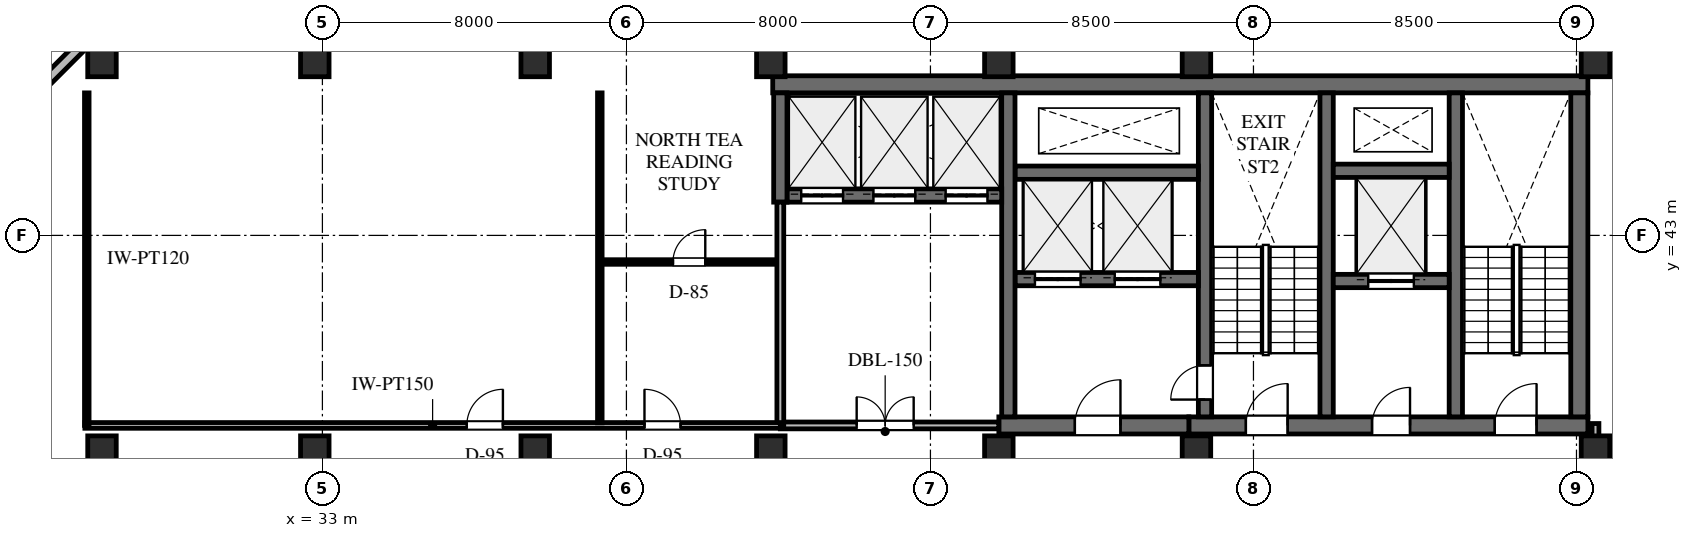
"""IFC4 building model, lengths in metres.
Left out: names, types, materials, properties, quantities, classifications, styles, units other than length and angle.
Written with IfcOpenShell. Run it as: python <this file> out.ifc"""

import sys

from ifc_helpers import new_model, si_unit, direction, frame, frame_2d, origin, origin_2d, place, context, subcontext, project, spatial, rectangle, extrude, element, fill, save


model = new_model("IFC4")
c1 = context("Model", 3, precision=1e-05, world=origin(), true_north=direction((0.0, 1.0)))
c2 = subcontext(c1, "Body", "Model", "MODEL_VIEW")
j1 = project(units=[si_unit("LENGTHUNIT", "METRE"), si_unit("PLANEANGLEUNIT", "RADIAN")], contexts=[c1])
p1 = place(None, origin())
s1 = spatial("IfcSite", under=j1, at=p1, CompositionType="ELEMENT")
p2 = place(p1, origin())
s2 = spatial("IfcBuilding", under=s1, at=p2, CompositionType="ELEMENT")
p3 = place(p2, frame((0.0, 0.0, 256.2)))
s3 = spatial("IfcBuildingStorey", under=s2, at=p3, CompositionType="ELEMENT", Elevation=256.2)
p4 = place(p3, frame((44.85, 46.975, 0.0), z_axis=(0.0, 0.0, 1.0), x_axis=(1.0, 0.0, 0.0)))
e1 = element("IfcWall", 1, at=p4, inside=s3, PredefinedType="SHEAR", context=c2, shape_type="SweptSolid", body=[
    extrude(rectangle(XDim=21.45, YDim=0.45, at=frame_2d((10.725, 0.0))), origin(), (0.0, 0.0, 1.0), 3.6),
])
p5 = place(p3, frame((55.8, 38.0, 0.0), z_axis=(0.0, 0.0, 1.0), x_axis=(1.0, 0.0, 0.0)))
e2 = element("IfcWall", 2, at=p5, inside=s3, PredefinedType="SHEAR", context=c2, shape_type="SweptSolid", body=[
    extrude(rectangle(XDim=10.5, YDim=0.45, at=frame_2d((5.25, 0.0))), origin(), (0.0, 0.0, 1.0), 3.6),
])
p6 = place(p5, frame((1.5, 0.0, 0.0)))
e3 = element("IfcOpeningElement", 3, at=p6, cuts=e2, PredefinedType="OPENING", context=c2, shape_type="SweptSolid", body=[
    extrude(rectangle(XDim=1.1, YDim=2.2, at=frame_2d((0.55, 1.1))), frame((0.0, 0.235, 0.0), z_axis=(0.0, -1.0, 0.0), x_axis=(1.0, 0.0, 0.0)), (0.0, 0.0, 1.0), 0.47),
])
p7 = place(p5, frame((4.82, 0.0, 0.0)))
e4 = element("IfcOpeningElement", 4, at=p7, cuts=e2, PredefinedType="OPENING", context=c2, shape_type="SweptSolid", body=[
    extrude(rectangle(XDim=1.0, YDim=2.15, at=frame_2d((0.5, 1.075))), frame((0.0, 0.235, 0.0), z_axis=(0.0, -1.0, 0.0), x_axis=(1.0, 0.0, 0.0)), (0.0, 0.0, 1.0), 0.47),
])
p8 = place(p5, frame((8.05, 0.0, 0.0)))
e5 = element("IfcOpeningElement", 5, at=p8, cuts=e2, PredefinedType="OPENING", context=c2, shape_type="SweptSolid", body=[
    extrude(rectangle(XDim=1.1, YDim=2.2, at=frame_2d((0.55, 1.1))), frame((0.0, 0.235, 0.0), z_axis=(0.0, -1.0, 0.0), x_axis=(1.0, 0.0, 0.0)), (0.0, 0.0, 1.0), 0.47),
])
p9 = place(p3, frame((66.075, 38.225, 0.0), z_axis=(0.0, 0.0, 1.0), x_axis=(0.0, 1.0, 0.0)))
e6 = element("IfcWall", 6, at=p9, inside=s3, PredefinedType="SHEAR", context=c2, shape_type="SweptSolid", body=[
    extrude(rectangle(XDim=8.525, YDim=0.45, at=frame_2d((4.262, 0.0))), origin(), (0.0, 0.0, 1.0), 3.6),
])
for number, where, z_axis, x_axis in (
    (7, (62.825, 38.225, 0.0), (0.0, 0.0, 1.0), (0.0, 1.0, 0.0)),
    (8, (59.425, 38.225, 0.0), (0.0, 0.0, 1.0), (0.0, 1.0, 0.0)),
):
    element("IfcWall", number, at=place(p3, frame(where, z_axis=z_axis, x_axis=x_axis)), inside=s3, PredefinedType="SHEAR", context=c2, shape_type="SweptSolid", body=[
        extrude(rectangle(XDim=8.525, YDim=0.35, at=frame_2d((4.262, 0.0))), origin(), (0.0, 0.0, 1.0), 3.6),
    ])
p10 = place(p3, frame((56.225, 38.225, 0.0), z_axis=(0.0, 0.0, 1.0), x_axis=(0.0, 1.0, 0.0)))
e9 = element("IfcWall", 9, at=p10, inside=s3, PredefinedType="SHEAR", context=c2, shape_type="SweptSolid", body=[
    extrude(rectangle(XDim=8.525, YDim=0.35, at=frame_2d((4.262, 0.0))), origin(), (0.0, 0.0, 1.0), 3.6),
])
p11 = place(p10, frame((0.455, 0.0, 0.0)))
e10 = element("IfcOpeningElement", 10, at=p11, cuts=e9, PredefinedType="OPENING", context=c2, shape_type="SweptSolid", body=[
    extrude(rectangle(XDim=0.9, YDim=2.15, at=frame_2d((0.45, 1.075))), frame((0.0, 0.185, 0.0), z_axis=(0.0, -1.0, 0.0), x_axis=(1.0, 0.0, 0.0)), (0.0, 0.0, 1.0), 0.37),
])
p12 = place(p3, frame((59.6, 41.8, 0.0), z_axis=(0.0, 0.0, 1.0), x_axis=(1.0, 0.0, 0.0)))
e11 = element("IfcWall", 11, at=p12, inside=s3, PredefinedType="SHEAR", context=c2, shape_type="SweptSolid", body=[
    extrude(rectangle(XDim=3.05, YDim=0.35, at=frame_2d((1.525, 0.0))), origin(), (0.0, 0.0, 1.0), 3.6),
])
p13 = place(p12, frame((0.92, 0.0, 0.0)))
e12 = element("IfcOpeningElement", 12, at=p13, cuts=e11, PredefinedType="OPENING", context=c2, shape_type="SweptSolid", body=[
    extrude(rectangle(XDim=1.2, YDim=2.2, at=frame_2d((0.6, 1.1))), frame((0.0, 0.185, 0.0), z_axis=(0.0, -1.0, 0.0), x_axis=(1.0, 0.0, 0.0)), (0.0, 0.0, 1.0), 0.37),
])
p14 = place(p3, frame((59.6, 44.7, 0.0), z_axis=(0.0, 0.0, 1.0), x_axis=(1.0, 0.0, 0.0)))
e13 = element("IfcWall", 13, at=p14, inside=s3, PredefinedType="SHEAR", context=c2, shape_type="SweptSolid", body=[
    extrude(rectangle(XDim=3.05, YDim=0.35, at=frame_2d((1.525, 0.0))), origin(), (0.0, 0.0, 1.0), 3.6),
])
p15 = place(p3, frame((50.8, 38.0, 0.0), z_axis=(0.0, 0.0, 1.0), x_axis=(1.0, 0.0, 0.0)))
e14 = element("IfcWall", 14, at=p15, inside=s3, PredefinedType="SHEAR", context=c2, shape_type="SweptSolid", body=[
    extrude(rectangle(XDim=5.0, YDim=0.45, at=frame_2d((2.5, 0.0))), origin(), (0.0, 0.0, 1.0), 3.6),
])
p16 = place(p15, frame((2.0, 0.0, 0.0)))
e15 = element("IfcOpeningElement", 15, at=p16, cuts=e14, PredefinedType="OPENING", context=c2, shape_type="SweptSolid", body=[
    extrude(rectangle(XDim=1.2, YDim=2.2, at=frame_2d((0.6, 1.1))), frame((0.0, 0.235, 0.0), z_axis=(0.0, -1.0, 0.0), x_axis=(1.0, 0.0, 0.0)), (0.0, 0.0, 1.0), 0.47),
])
p17 = place(p3, frame((51.225, 41.85, 0.0), z_axis=(0.0, 0.0, 1.0), x_axis=(1.0, 0.0, 0.0)))
e16 = element("IfcWall", 16, at=p17, inside=s3, PredefinedType="SHEAR", context=c2, shape_type="SweptSolid", body=[
    extrude(rectangle(XDim=4.825, YDim=0.35, at=frame_2d((2.413, 0.0))), origin(), (0.0, 0.0, 1.0), 3.6),
])
p18 = place(p17, frame((0.525, 0.0, 0.0)))
e17 = element("IfcOpeningElement", 17, at=p18, cuts=e16, PredefinedType="OPENING", context=c2, shape_type="SweptSolid", body=[
    extrude(rectangle(XDim=1.2, YDim=2.2, at=frame_2d((0.6, 1.1))), frame((0.0, 0.185, 0.0), z_axis=(0.0, -1.0, 0.0), x_axis=(1.0, 0.0, 0.0)), (0.0, 0.0, 1.0), 0.37),
])
p19 = place(p17, frame((2.625, 0.0, 0.0)))
e18 = element("IfcOpeningElement", 18, at=p19, cuts=e16, PredefinedType="OPENING", context=c2, shape_type="SweptSolid", body=[
    extrude(rectangle(XDim=1.2, YDim=2.2, at=frame_2d((0.6, 1.1))), frame((0.0, 0.185, 0.0), z_axis=(0.0, -1.0, 0.0), x_axis=(1.0, 0.0, 0.0)), (0.0, 0.0, 1.0), 0.37),
])
p20 = place(p3, frame((51.225, 44.65, 0.0), z_axis=(0.0, 0.0, 1.0), x_axis=(1.0, 0.0, 0.0)))
e19 = element("IfcWall", 19, at=p20, inside=s3, PredefinedType="SHEAR", context=c2, shape_type="SweptSolid", body=[
    extrude(rectangle(XDim=4.825, YDim=0.35, at=frame_2d((2.413, 0.0))), origin(), (0.0, 0.0, 1.0), 3.6),
])
p21 = place(p3, frame((51.05, 38.225, 0.0), z_axis=(0.0, 0.0, 1.0), x_axis=(0.0, 1.0, 0.0)))
e20 = element("IfcWall", 20, at=p21, inside=s3, PredefinedType="SHEAR", context=c2, shape_type="SweptSolid", body=[
    extrude(rectangle(XDim=8.525, YDim=0.35, at=frame_2d((4.262, 0.0))), origin(), (0.0, 0.0, 1.0), 3.6),
])
p22 = place(p3, frame((45.225, 44.05, 0.0), z_axis=(0.0, 0.0, 1.0), x_axis=(1.0, 0.0, 0.0)))
e21 = element("IfcWall", 21, at=p22, inside=s3, PredefinedType="SHEAR", context=c2, shape_type="SweptSolid", body=[
    extrude(rectangle(XDim=5.65, YDim=0.35, at=frame_2d((2.825, 0.0))), origin(), (0.0, 0.0, 1.0), 3.6),
])
p23 = place(p22, frame((0.375, 0.0, 0.0)))
e22 = element("IfcOpeningElement", 22, at=p23, cuts=e21, PredefinedType="OPENING", context=c2, shape_type="SweptSolid", body=[
    extrude(rectangle(XDim=1.1, YDim=2.2, at=frame_2d((0.55, 1.1))), frame((0.0, 0.185, 0.0), z_axis=(0.0, -1.0, 0.0), x_axis=(1.0, 0.0, 0.0)), (0.0, 0.0, 1.0), 0.37),
])
p24 = place(p22, frame((2.275, 0.0, 0.0)))
e23 = element("IfcOpeningElement", 23, at=p24, cuts=e21, PredefinedType="OPENING", context=c2, shape_type="SweptSolid", body=[
    extrude(rectangle(XDim=1.1, YDim=2.2, at=frame_2d((0.55, 1.1))), frame((0.0, 0.185, 0.0), z_axis=(0.0, -1.0, 0.0), x_axis=(1.0, 0.0, 0.0)), (0.0, 0.0, 1.0), 0.37),
])
p25 = place(p22, frame((4.175, 0.0, 0.0)))
e24 = element("IfcOpeningElement", 24, at=p25, cuts=e21, PredefinedType="OPENING", context=c2, shape_type="SweptSolid", body=[
    extrude(rectangle(XDim=1.1, YDim=2.2, at=frame_2d((0.55, 1.1))), frame((0.0, 0.185, 0.0), z_axis=(0.0, -1.0, 0.0), x_axis=(1.0, 0.0, 0.0)), (0.0, 0.0, 1.0), 0.37),
])
p26 = place(p3, frame((45.05, 43.875, 0.0), z_axis=(0.0, 0.0, 1.0), x_axis=(0.0, 1.0, 0.0)))
e25 = element("IfcWall", 25, at=p26, inside=s3, PredefinedType="SHEAR", context=c2, shape_type="SweptSolid", body=[
    extrude(rectangle(XDim=2.875, YDim=0.35, at=frame_2d((1.438, 0.0))), origin(), (0.0, 0.0, 1.0), 3.6),
])
for number, where, z_axis, x_axis in (
    (26, (66.5, 47.55, 0.0), (0.0, 0.0, 1.0), (1.0, 0.0, 0.0)),
    (27, (56.0, 47.55, 0.0), (0.0, 0.0, 1.0), (1.0, 0.0, 0.0)),
    (28, (66.5, 37.35, 0.0), (0.0, 0.0, 1.0), (1.0, 0.0, 0.0)),
    (29, (56.0, 37.35, 0.0), (0.0, 0.0, 1.0), (1.0, 0.0, 0.0)),
    (30, (50.8, 47.55, 0.0), (0.0, 0.0, 1.0), (1.0, 0.0, 0.0)),
    (31, (50.8, 37.35, 0.0), (0.0, 0.0, 1.0), (1.0, 0.0, 0.0)),
    (32, (44.8, 37.35, 0.0), (0.0, 0.0, 1.0), (1.0, 0.0, 0.0)),
    (33, (44.8, 47.55, 0.0), (0.0, 0.0, 1.0), (1.0, 0.0, 0.0)),
    (34, (38.6, 37.35, 0.0), (0.0, 0.0, 1.0), (1.0, 0.0, 0.0)),
    (35, (38.6, 47.55, 0.0), (0.0, 0.0, 1.0), (1.0, 0.0, 0.0)),
    (36, (32.8, 37.35, 0.0), (0.0, 0.0, 1.0), (1.0, 0.0, 0.0)),
    (37, (32.8, 47.55, 0.0), (0.0, 0.0, 1.0), (1.0, 0.0, 0.0)),
    (38, (27.2, 37.35, 0.0), (0.0, 0.0, 1.0), (1.0, 0.0, 0.0)),
    (39, (27.2, 47.55, 0.0), (0.0, 0.0, 1.0), (1.0, 0.0, 0.0)),
):
    element("IfcColumn", number, at=place(p3, frame(where, z_axis=z_axis, x_axis=x_axis)), inside=s3, PredefinedType="COLUMN", context=c2, shape_type="SweptSolid", body=[
        extrude(rectangle(XDim=0.75, YDim=0.75, at=origin_2d()), origin(), (0.0, 0.0, 1.0), 3.6),
    ])
p27 = place(p3, frame((25.12, 46.45, 0.0), z_axis=(0.0, 0.0, 1.0), x_axis=(0.707106781187, 0.707106781187, 0.0)))
e40 = element("IfcWall", 40, at=p27, inside=s3, PredefinedType="STANDARD", context=c2, shape_type="SweptSolid", body=[
    extrude(rectangle(XDim=2.729, YDim=0.28, at=frame_2d((1.365, 0.0))), origin(), (0.0, 0.0, 1.0), 3.36),
])
p28 = place(p3, frame((68.375, 37.8, 0.0), z_axis=(0.0, 0.0, 1.0), x_axis=(-0.13917438523, -0.990267888248, 0.0)))
e41 = element("IfcWall", 41, at=p28, inside=s3, PredefinedType="STANDARD", context=c2, shape_type="SweptSolid", body=[
    extrude(rectangle(XDim=18.135, YDim=0.28, at=frame_2d((9.067, 0.0))), origin(), (0.0, 0.0, 1.0), 3.36),
])
p29 = place(p28, frame((8.198, 0.0, 0.0)))
e42 = element("IfcOpeningElement", 42, at=p29, cuts=e41, PredefinedType="OPENING", context=c2, shape_type="SweptSolid", body=[
    extrude(rectangle(XDim=1.0, YDim=2.15, at=frame_2d((0.5, 1.075))), frame((0.0, 0.15, 0.0), z_axis=(0.0, -1.0, 0.0), x_axis=(1.0, 0.0, 0.0)), (0.0, 0.0, 1.0), 0.3),
])
p30 = place(p28, frame((3.997, 0.0, 0.65)))
e43 = element("IfcOpeningElement", 43, at=p30, cuts=e41, PredefinedType="OPENING", context=c2, shape_type="SweptSolid", body=[
    extrude(rectangle(XDim=1.8, YDim=2.1, at=frame_2d((0.9, 1.05))), frame((0.0, 0.15, 0.0), z_axis=(0.0, -1.0, 0.0), x_axis=(1.0, 0.0, 0.0)), (0.0, 0.0, 1.0), 0.3),
])
p31 = place(p28, frame((12.217, 0.0, 0.65)))
e44 = element("IfcOpeningElement", 44, at=p31, cuts=e41, PredefinedType="OPENING", context=c2, shape_type="SweptSolid", body=[
    extrude(rectangle(XDim=1.8, YDim=2.1, at=frame_2d((0.9, 1.05))), frame((0.0, 0.15, 0.0), z_axis=(0.0, -1.0, 0.0), x_axis=(1.0, 0.0, 0.0)), (0.0, 0.0, 1.0), 0.3),
])
p32 = place(p3, frame((45.05, 38.0, 0.0), z_axis=(0.0, 0.0, 1.0), x_axis=(1.0, 0.0, 0.0)))
e45 = element("IfcWall", 45, at=p32, inside=s3, PredefinedType="STANDARD", context=c2, shape_type="SweptSolid", body=[
    extrude(rectangle(XDim=5.75, YDim=0.18, at=frame_2d((2.875, 0.0))), origin(), (0.0, 0.0, 1.0), 2.664),
])
p33 = place(p32, frame((2.009, 0.0, 0.0)))
e46 = element("IfcOpeningElement", 46, at=p33, cuts=e45, PredefinedType="OPENING", context=c2, shape_type="SweptSolid", body=[
    extrude(rectangle(XDim=1.5, YDim=2.2, at=frame_2d((0.75, 1.1))), frame((0.0, 0.1, 0.0), z_axis=(0.0, -1.0, 0.0), x_axis=(1.0, 0.0, 0.0)), (0.0, 0.0, 1.0), 0.2),
])
p34 = place(p3, frame((45.05, 38.0, 0.0), z_axis=(0.0, 0.0, 1.0), x_axis=(0.0, 1.0, 0.0)))
e47 = element("IfcWall", 47, at=p34, inside=s3, PredefinedType="STANDARD", context=c2, shape_type="SweptSolid", body=[
    extrude(rectangle(XDim=5.875, YDim=0.18, at=frame_2d((2.938, 0.0))), origin(), (0.0, 0.0, 1.0), 2.664),
])
p35 = place(p3, frame((26.75, 38.0, 0.0), z_axis=(0.0, 0.0, 1.0), x_axis=(1.0, 0.0, 0.0)))
e48 = element("IfcWall", 48, at=p35, inside=s3, PredefinedType="PARTITIONING", context=c2, shape_type="SweptSolid", body=[
    extrude(rectangle(XDim=18.3, YDim=0.15, at=frame_2d((9.15, 0.0))), origin(), (0.0, 0.0, 1.0), 2.664),
])
p36 = place(p35, frame((10.05, 0.0, 0.0)))
e49 = element("IfcOpeningElement", 49, at=p36, cuts=e48, PredefinedType="OPENING", context=c2, shape_type="SweptSolid", body=[
    extrude(rectangle(XDim=0.95, YDim=2.15, at=frame_2d((0.475, 1.075))), frame((0.0, 0.085, 0.0), z_axis=(0.0, -1.0, 0.0), x_axis=(1.0, 0.0, 0.0)), (0.0, 0.0, 1.0), 0.17),
])
p37 = place(p35, frame((14.725, 0.0, 0.0)))
e50 = element("IfcOpeningElement", 50, at=p37, cuts=e48, PredefinedType="OPENING", context=c2, shape_type="SweptSolid", body=[
    extrude(rectangle(XDim=0.95, YDim=2.15, at=frame_2d((0.475, 1.075))), frame((0.0, 0.085, 0.0), z_axis=(0.0, -1.0, 0.0), x_axis=(1.0, 0.0, 0.0)), (0.0, 0.0, 1.0), 0.17),
])
p38 = place(p3, frame((26.8, 38.0, 0.0), z_axis=(0.0, 0.0, 1.0), x_axis=(0.0, 1.0, 0.0)))
e51 = element("IfcWall", 51, at=p38, inside=s3, PredefinedType="PARTITIONING", context=c2, shape_type="SweptSolid", body=[
    extrude(rectangle(XDim=8.75, YDim=0.12, at=frame_2d((4.375, 0.0))), origin(), (0.0, 0.0, 1.0), 3.36),
])
p39 = place(p3, frame((40.3, 38.068, 0.0), z_axis=(0.0, 0.0, 1.0), x_axis=(0.0, 1.0, 0.0)))
e52 = element("IfcWall", 52, at=p39, inside=s3, PredefinedType="PARTITIONING", context=c2, shape_type="SweptSolid", body=[
    extrude(rectangle(XDim=8.682, YDim=0.12, at=frame_2d((4.341, 0.0))), origin(), (0.0, 0.0, 1.0), 3.36),
])
p40 = place(p3, frame((40.368, 42.3, 0.0), z_axis=(0.0, 0.0, 1.0), x_axis=(1.0, 0.0, 0.0)))
e53 = element("IfcWall", 53, at=p40, inside=s3, PredefinedType="PARTITIONING", context=c2, shape_type="SweptSolid", body=[
    extrude(rectangle(XDim=4.564, YDim=0.12, at=frame_2d((2.282, 0.0))), origin(), (0.0, 0.0, 1.0), 2.664),
])
p41 = place(p40, frame((1.857, 0.0, 0.0)))
e54 = element("IfcOpeningElement", 54, at=p41, cuts=e53, PredefinedType="OPENING", context=c2, shape_type="SweptSolid", body=[
    extrude(rectangle(XDim=0.85, YDim=2.1, at=frame_2d((0.425, 1.05))), frame((0.0, 0.07, 0.0), z_axis=(0.0, -1.0, 0.0), x_axis=(1.0, 0.0, 0.0)), (0.0, 0.0, 1.0), 0.14),
])
p42 = place(p3, frame((66.5, 34.468, 0.0), z_axis=(0.0, 0.0, 1.0), x_axis=(0.0, 1.0, 0.0)))
e55 = element("IfcWall", 55, at=p42, inside=s3, PredefinedType="STANDARD", context=c2, shape_type="SweptSolid", body=[
    extrude(rectangle(XDim=3.582, YDim=0.18, at=frame_2d((1.791, 0.0))), origin(), (0.0, 0.0, 1.0), 2.664),
])
p43 = place(p6, origin())
e56 = element("IfcDoor", 56, at=p43, inside=s3, OperationType="SINGLE_SWING_RIGHT", PredefinedType="DOOR", context=c2, shape_type="SweptSolid", body=[
    extrude(rectangle(XDim=1.1, YDim=2.2, at=frame_2d((0.55, 1.1))), frame((0.0, 0.025, 0.0), z_axis=(0.0, -1.0, 0.0), x_axis=(1.0, 0.0, 0.0)), (0.0, 0.0, 1.0), 0.05),
])
fill(e3, e56)
p44 = place(p7, origin())
e57 = element("IfcDoor", 57, at=p44, inside=s3, OperationType="SINGLE_SWING_RIGHT", PredefinedType="DOOR", context=c2, shape_type="SweptSolid", body=[
    extrude(rectangle(XDim=1.0, YDim=2.15, at=frame_2d((0.5, 1.075))), frame((0.0, 0.025, 0.0), z_axis=(0.0, -1.0, 0.0), x_axis=(1.0, 0.0, 0.0)), (0.0, 0.0, 1.0), 0.05),
])
fill(e4, e57)
p45 = place(p8, origin())
e58 = element("IfcDoor", 58, at=p45, inside=s3, OperationType="SINGLE_SWING_RIGHT", PredefinedType="DOOR", context=c2, shape_type="SweptSolid", body=[
    extrude(rectangle(XDim=1.1, YDim=2.2, at=frame_2d((0.55, 1.1))), frame((0.0, 0.025, 0.0), z_axis=(0.0, -1.0, 0.0), x_axis=(1.0, 0.0, 0.0)), (0.0, 0.0, 1.0), 0.05),
])
fill(e5, e58)
p46 = place(p16, origin())
e59 = element("IfcDoor", 59, at=p46, inside=s3, OperationType="SINGLE_SWING_RIGHT", PredefinedType="DOOR", context=c2, shape_type="SweptSolid", body=[
    extrude(rectangle(XDim=1.2, YDim=2.2, at=frame_2d((0.6, 1.1))), frame((0.0, 0.025, 0.0), z_axis=(0.0, -1.0, 0.0), x_axis=(1.0, 0.0, 0.0)), (0.0, 0.0, 1.0), 0.05),
])
fill(e15, e59)
p47 = place(p11, origin())
e60 = element("IfcDoor", 60, at=p47, inside=s3, OperationType="SINGLE_SWING_LEFT", PredefinedType="DOOR", context=c2, shape_type="SweptSolid", body=[
    extrude(rectangle(XDim=0.9, YDim=2.15, at=frame_2d((0.45, 1.075))), frame((0.0, 0.025, 0.0), z_axis=(0.0, -1.0, 0.0), x_axis=(1.0, 0.0, 0.0)), (0.0, 0.0, 1.0), 0.05),
])
fill(e10, e60)
p48 = place(p23, origin())
e61 = element("IfcDoor", 61, at=p48, inside=s3, OperationType="DOUBLE_DOOR_SLIDING", PredefinedType="DOOR", context=c2, shape_type="SweptSolid", body=[
    extrude(rectangle(XDim=1.1, YDim=2.2, at=frame_2d((0.55, 1.1))), frame((0.0, 0.025, 0.0), z_axis=(0.0, -1.0, 0.0), x_axis=(1.0, 0.0, 0.0)), (0.0, 0.0, 1.0), 0.05),
])
fill(e22, e61)
p49 = place(p24, origin())
e62 = element("IfcDoor", 62, at=p49, inside=s3, OperationType="DOUBLE_DOOR_SLIDING", PredefinedType="DOOR", context=c2, shape_type="SweptSolid", body=[
    extrude(rectangle(XDim=1.1, YDim=2.2, at=frame_2d((0.55, 1.1))), frame((0.0, 0.025, 0.0), z_axis=(0.0, -1.0, 0.0), x_axis=(1.0, 0.0, 0.0)), (0.0, 0.0, 1.0), 0.05),
])
fill(e23, e62)
p50 = place(p25, origin())
e63 = element("IfcDoor", 63, at=p50, inside=s3, OperationType="DOUBLE_DOOR_SLIDING", PredefinedType="DOOR", context=c2, shape_type="SweptSolid", body=[
    extrude(rectangle(XDim=1.1, YDim=2.2, at=frame_2d((0.55, 1.1))), frame((0.0, 0.025, 0.0), z_axis=(0.0, -1.0, 0.0), x_axis=(1.0, 0.0, 0.0)), (0.0, 0.0, 1.0), 0.05),
])
fill(e24, e63)
p51 = place(p18, origin())
e64 = element("IfcDoor", 64, at=p51, inside=s3, OperationType="DOUBLE_DOOR_SLIDING", PredefinedType="DOOR", context=c2, shape_type="SweptSolid", body=[
    extrude(rectangle(XDim=1.2, YDim=2.2, at=frame_2d((0.6, 1.1))), frame((0.0, 0.025, 0.0), z_axis=(0.0, -1.0, 0.0), x_axis=(1.0, 0.0, 0.0)), (0.0, 0.0, 1.0), 0.05),
])
fill(e17, e64)
p52 = place(p19, origin())
e65 = element("IfcDoor", 65, at=p52, inside=s3, OperationType="DOUBLE_DOOR_SLIDING", PredefinedType="DOOR", context=c2, shape_type="SweptSolid", body=[
    extrude(rectangle(XDim=1.2, YDim=2.2, at=frame_2d((0.6, 1.1))), frame((0.0, 0.025, 0.0), z_axis=(0.0, -1.0, 0.0), x_axis=(1.0, 0.0, 0.0)), (0.0, 0.0, 1.0), 0.05),
])
fill(e18, e65)
p53 = place(p13, origin())
e66 = element("IfcDoor", 66, at=p53, inside=s3, OperationType="DOUBLE_DOOR_SLIDING", PredefinedType="DOOR", context=c2, shape_type="SweptSolid", body=[
    extrude(rectangle(XDim=1.2, YDim=2.2, at=frame_2d((0.6, 1.1))), frame((0.0, 0.025, 0.0), z_axis=(0.0, -1.0, 0.0), x_axis=(1.0, 0.0, 0.0)), (0.0, 0.0, 1.0), 0.05),
])
fill(e12, e66)
p54 = place(p33, origin())
e67 = element("IfcDoor", 67, at=p54, inside=s3, OperationType="DOUBLE_DOOR_SINGLE_SWING", PredefinedType="DOOR", context=c2, shape_type="SweptSolid", body=[
    extrude(rectangle(XDim=1.5, YDim=2.2, at=frame_2d((0.75, 1.1))), frame((0.0, 0.025, 0.0), z_axis=(0.0, -1.0, 0.0), x_axis=(1.0, 0.0, 0.0)), (0.0, 0.0, 1.0), 0.05),
])
fill(e46, e67)
p55 = place(p36, origin())
e68 = element("IfcDoor", 68, at=p55, inside=s3, OperationType="SINGLE_SWING_RIGHT", PredefinedType="DOOR", context=c2, shape_type="SweptSolid", body=[
    extrude(rectangle(XDim=0.95, YDim=2.15, at=frame_2d((0.475, 1.075))), frame((0.0, 0.025, 0.0), z_axis=(0.0, -1.0, 0.0), x_axis=(1.0, 0.0, 0.0)), (0.0, 0.0, 1.0), 0.05),
])
fill(e49, e68)
p56 = place(p37, origin())
e69 = element("IfcDoor", 69, at=p56, inside=s3, OperationType="SINGLE_SWING_LEFT", PredefinedType="DOOR", context=c2, shape_type="SweptSolid", body=[
    extrude(rectangle(XDim=0.95, YDim=2.15, at=frame_2d((0.475, 1.075))), frame((0.0, 0.025, 0.0), z_axis=(0.0, -1.0, 0.0), x_axis=(1.0, 0.0, 0.0)), (0.0, 0.0, 1.0), 0.05),
])
fill(e50, e69)
p57 = place(p41, origin())
e70 = element("IfcDoor", 70, at=p57, inside=s3, OperationType="SINGLE_SWING_RIGHT", PredefinedType="DOOR", context=c2, shape_type="SweptSolid", body=[
    extrude(rectangle(XDim=0.85, YDim=2.1, at=frame_2d((0.425, 1.05))), frame((0.0, 0.025, 0.0), z_axis=(0.0, -1.0, 0.0), x_axis=(1.0, 0.0, 0.0)), (0.0, 0.0, 1.0), 0.05),
])
fill(e54, e70)
save(model, sys.argv[1])
